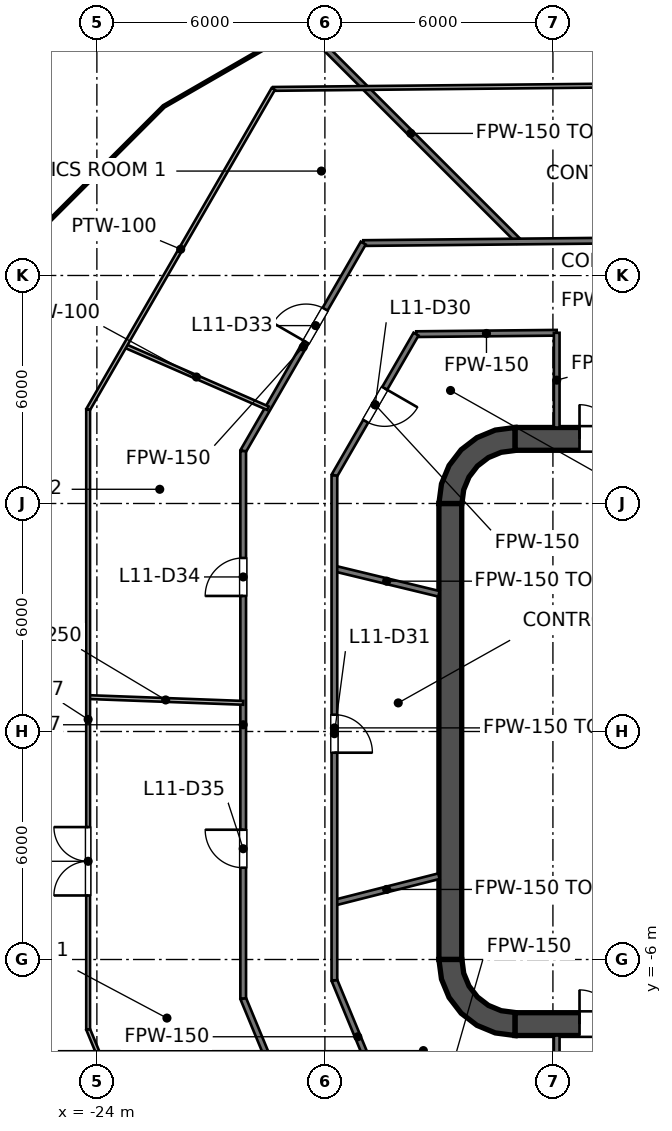
"""IFC4 building model, lengths in metres.
Left out: names, types, materials, properties, quantities, classifications, styles, units other than length and angle.
Written with IfcOpenShell. Run it as: python <this file> out.ifc"""

import sys

from ifc_helpers import new_model, si_unit, direction, frame, frame_2d, origin, place, context, subcontext, project, spatial, polyline, rectangle, outline, extrude, element, fill, save


model = new_model("IFC4")
c1 = context("Model", 3, precision=1e-05, world=origin(), true_north=direction((0.0, 1.0)))
c2 = subcontext(c1, "Body", "Model", "MODEL_VIEW")
j1 = project(units=[si_unit("LENGTHUNIT", "METRE"), si_unit("PLANEANGLEUNIT", "RADIAN")], contexts=[c1])
p1 = place(None, origin())
s1 = spatial("IfcSite", under=j1, at=p1, CompositionType="ELEMENT")
p2 = place(p1, origin())
s2 = spatial("IfcBuilding", under=s1, at=p2, CompositionType="ELEMENT")
p3 = place(p2, frame((0.0, 0.0, 67.2)))
s3 = spatial("IfcBuildingStorey", under=s2, at=p3, CompositionType="ELEMENT", Elevation=67.2)
p4 = place(p3, frame((-13.0, 7.7, 0.0), z_axis=(0.0, 0.0, 1.0), x_axis=(1.0, 0.0, 0.0)))
e1 = element("IfcWall", 1, at=p4, inside=s3, PredefinedType="SHEAR", context=c2, shape_type="SweptSolid", body=[
    extrude(rectangle(XDim=26.0, YDim=0.6, at=frame_2d((13.0, 0.0))), origin(), (0.0, 0.0, 1.0), 4.2),
])
p5 = place(p4, frame((1.7, 0.0, 0.0)))
e2 = element("IfcOpeningElement", 2, at=p5, cuts=e1, PredefinedType="OPENING", context=c2, shape_type="SweptSolid", body=[
    extrude(rectangle(XDim=1.8, YDim=2.1, at=frame_2d((0.9, 1.05))), frame((0.0, 0.3, 0.0), z_axis=(0.0, -1.0, 0.0), x_axis=(1.0, 0.0, 0.0)), (0.0, 0.0, 1.0), 0.6),
])
p6 = place(p4, frame((22.5, 0.0, 0.0)))
e3 = element("IfcOpeningElement", 3, at=p6, cuts=e1, PredefinedType="OPENING", context=c2, shape_type="SweptSolid", body=[
    extrude(rectangle(XDim=1.8, YDim=2.1, at=frame_2d((0.9, 1.05))), frame((0.0, 0.3, 0.0), z_axis=(0.0, -1.0, 0.0), x_axis=(1.0, 0.0, 0.0)), (0.0, 0.0, 1.0), 0.6),
])
p7 = place(p3, frame((-13.0, -7.7, 0.0), z_axis=(0.0, 0.0, 1.0), x_axis=(1.0, 0.0, 0.0)))
e4 = element("IfcWall", 4, at=p7, inside=s3, PredefinedType="SHEAR", context=c2, shape_type="SweptSolid", body=[
    extrude(rectangle(XDim=26.0, YDim=0.6, at=frame_2d((13.0, 0.0))), origin(), (0.0, 0.0, 1.0), 4.2),
])
p8 = place(p7, frame((1.7, 0.0, 0.0)))
e5 = element("IfcOpeningElement", 5, at=p8, cuts=e4, PredefinedType="OPENING", context=c2, shape_type="SweptSolid", body=[
    extrude(rectangle(XDim=1.8, YDim=2.1, at=frame_2d((0.9, 1.05))), frame((0.0, 0.3, 0.0), z_axis=(0.0, -1.0, 0.0), x_axis=(1.0, 0.0, 0.0)), (0.0, 0.0, 1.0), 0.6),
])
p9 = place(p7, frame((22.5, 0.0, 0.0)))
e6 = element("IfcOpeningElement", 6, at=p9, cuts=e4, PredefinedType="OPENING", context=c2, shape_type="SweptSolid", body=[
    extrude(rectangle(XDim=1.8, YDim=2.1, at=frame_2d((0.9, 1.05))), frame((0.0, 0.3, 0.0), z_axis=(0.0, -1.0, 0.0), x_axis=(1.0, 0.0, 0.0)), (0.0, 0.0, 1.0), 0.6),
])
p10 = place(p3, frame((-14.7, -6.0, 0.0), z_axis=(0.0, 0.0, 1.0), x_axis=(0.0, 1.0, 0.0)))
e7 = element("IfcWall", 7, at=p10, inside=s3, PredefinedType="SHEAR", context=c2, shape_type="SweptSolid", body=[
    extrude(rectangle(XDim=12.0, YDim=0.6, at=frame_2d((6.0, 0.0))), origin(), (0.0, 0.0, 1.0), 4.2),
])
p11 = place(p3, origin())
e8 = element("IfcWall", 8, at=p11, inside=s3, PredefinedType="SHEAR", context=c2, shape_type="SweptSolid", body=[
    extrude(outline(polyline([(-15.0, 6.0), (-14.395, 6.0), (-14.347, 6.361), (-14.208, 6.698), (-13.986, 6.986), (-13.698, 7.208), (-13.361, 7.347), (-13.0, 7.395), (-13.0, 8.0), (-13.518, 7.932), (-14.0, 7.732), (-14.414, 7.414), (-14.732, 7.0), (-14.932, 6.518), (-15.0, 6.0)])), origin(), (0.0, 0.0, 1.0), 4.2),
])
e9 = element("IfcWall", 9, at=p11, inside=s3, PredefinedType="SHEAR", context=c2, shape_type="SweptSolid", body=[
    extrude(outline(polyline([(-13.0, -8.0), (-13.0, -7.395), (-13.361, -7.347), (-13.698, -7.208), (-13.986, -6.986), (-14.208, -6.698), (-14.347, -6.361), (-14.395, -6.0), (-15.0, -6.0), (-14.932, -6.518), (-14.732, -7.0), (-14.414, -7.414), (-14.0, -7.732), (-13.518, -7.932), (-13.0, -8.0)])), origin(), (0.0, 0.0, 1.0), 4.2),
])
p12 = place(p3, frame((-11.8, -7.4, 0.0), z_axis=(0.0, 0.0, 1.0), x_axis=(0.0, 1.0, 0.0)))
e10 = element("IfcWall", 10, at=p12, inside=s3, PredefinedType="SOLIDWALL", context=c2, shape_type="SweptSolid", body=[
    extrude(rectangle(XDim=14.8, YDim=0.4, at=frame_2d((7.4, 0.0))), origin(), (0.0, 0.0, 1.0), 4.05),
])
p13 = place(p12, frame((11.2, 0.0, 0.0)))
e11 = element("IfcOpeningElement", 11, at=p13, cuts=e10, PredefinedType="OPENING", context=c2, shape_type="SweptSolid", body=[
    extrude(rectangle(XDim=1.1, YDim=2.1, at=frame_2d((0.55, 1.05))), frame((0.0, 0.2, 0.0), z_axis=(0.0, -1.0, 0.0), x_axis=(1.0, 0.0, 0.0)), (0.0, 0.0, 1.0), 0.4),
])
p14 = place(p12, frame((8.3, 0.0, 0.0)))
e12 = element("IfcOpeningElement", 12, at=p14, cuts=e10, PredefinedType="OPENING", context=c2, shape_type="SweptSolid", body=[
    extrude(rectangle(XDim=1.1, YDim=2.1, at=frame_2d((0.55, 1.05))), frame((0.0, 0.2, 0.0), z_axis=(0.0, -1.0, 0.0), x_axis=(1.0, 0.0, 0.0)), (0.0, 0.0, 1.0), 0.4),
])
p15 = place(p12, frame((5.4, 0.0, 0.0)))
e13 = element("IfcOpeningElement", 13, at=p15, cuts=e10, PredefinedType="OPENING", context=c2, shape_type="SweptSolid", body=[
    extrude(rectangle(XDim=1.1, YDim=2.1, at=frame_2d((0.55, 1.05))), frame((0.0, 0.2, 0.0), z_axis=(0.0, -1.0, 0.0), x_axis=(1.0, 0.0, 0.0)), (0.0, 0.0, 1.0), 0.4),
])
p16 = place(p12, frame((13.552, 0.0, 0.0)))
e14 = element("IfcOpeningElement", 14, at=p16, cuts=e10, PredefinedType="OPENING", context=c2, shape_type="SweptSolid", body=[
    extrude(rectangle(XDim=0.9, YDim=2.1, at=frame_2d((0.45, 1.05))), frame((0.0, 0.2, 0.0), z_axis=(0.0, -1.0, 0.0), x_axis=(1.0, 0.0, 0.0)), (0.0, 0.0, 1.0), 0.4),
])
p17 = place(p12, frame((0.347, 0.0, 0.0)))
e15 = element("IfcOpeningElement", 15, at=p17, cuts=e10, PredefinedType="OPENING", context=c2, shape_type="SweptSolid", body=[
    extrude(rectangle(XDim=0.9, YDim=2.1, at=frame_2d((0.45, 1.05))), frame((0.0, 0.2, 0.0), z_axis=(0.0, -1.0, 0.0), x_axis=(1.0, 0.0, 0.0)), (0.0, 0.0, 1.0), 0.4),
])
e16 = element("IfcWall", 16, at=p11, inside=s3, PredefinedType="SOLIDWALL", context=c2, shape_type="SweptSolid", body=[
    extrude(outline(polyline([(-12.0, -5.925), (-12.0, -5.675), (-14.15, -5.675), (-14.15, -3.025), (-12.0, -3.025), (-12.0, -2.775), (-14.15, -2.775), (-14.15, -0.125), (-12.0, -0.125), (-12.0, 0.125), (-14.15, 0.125), (-14.15, 2.775), (-12.0, 2.775), (-12.0, 3.025), (-14.15, 3.025), (-14.15, 5.675), (-12.0, 5.675), (-12.0, 5.925), (-14.15, 5.925), (-14.4, 5.925), (-14.4, 5.675), (-14.4, 3.025), (-14.4, 2.775), (-14.4, 0.125), (-14.4, -0.125), (-14.4, -2.775), (-14.4, -3.025), (-14.4, -5.675), (-14.4, -5.925), (-14.15, -5.925), (-12.0, -5.925)])), origin(), (0.0, 0.0, 1.0), 4.05),
])
p18 = place(p3, frame((-20.15, -7.025, 0.0), z_axis=(0.0, 0.0, 1.0), x_axis=(0.382713655067, -0.923867013279, 0.0)))
e17 = element("IfcWall", 17, at=p18, inside=s3, PredefinedType="PARTITIONING", context=c2, shape_type="SweptSolid", body=[
    extrude(rectangle(XDim=4.688, YDim=0.15, at=frame_2d((2.344, 0.0))), origin(), (0.0, 0.0, 1.0), 3.195),
])
p19 = place(p3, frame((-17.75, -6.547, 0.0), z_axis=(0.0, 0.0, 1.0), x_axis=(0.382760687394, -0.923847528646, 0.0)))
e18 = element("IfcWall", 18, at=p19, inside=s3, PredefinedType="PARTITIONING", context=c2, shape_type="SweptSolid", body=[
    extrude(rectangle(XDim=3.217, YDim=0.15, at=frame_2d((1.608, 0.0))), origin(), (0.0, 0.0, 1.0), 3.195),
])
p20 = place(p3, frame((-18.584, 18.584, 0.0), z_axis=(0.0, 0.0, 1.0), x_axis=(0.707106781187, -0.707106781187, 0.0)))
e19 = element("IfcWall", 19, at=p20, inside=s3, PredefinedType="PARTITIONING", context=c2, shape_type="SweptSolid", body=[
    extrude(rectangle(XDim=8.047, YDim=0.15, at=frame_2d((4.023, 0.0))), origin(), (0.0, 0.0, 1.0), 3.276),
])
p21 = place(p3, frame((-17.75, 4.288, 0.0), z_axis=(0.0, 0.0, 1.0), x_axis=(0.972001384863, -0.234975121714, 0.0)))
e20 = element("IfcWall", 20, at=p21, inside=s3, PredefinedType="PARTITIONING", context=c2, shape_type="SweptSolid", body=[
    extrude(rectangle(XDim=2.829, YDim=0.15, at=frame_2d((1.415, 0.0))), origin(), (0.0, 0.0, 1.0), 3.127),
])
p22 = place(p3, frame((-15.597, 10.456, 0.0), z_axis=(0.0, 0.0, 1.0), x_axis=(0.999950943482, 0.009905080996, 0.0)))
e21 = element("IfcWall", 21, at=p22, inside=s3, PredefinedType="PARTITIONING", context=c2, shape_type="SweptSolid", body=[
    extrude(rectangle(XDim=3.697, YDim=0.15, at=frame_2d((1.849, 0.0))), origin(), (0.0, 0.0, 1.0), 3.195),
])
p23 = place(p3, frame((-16.99, 12.853, 0.0), z_axis=(0.0, 0.0, 1.0), x_axis=(0.999950928474, 0.009906596006, 0.0)))
e22 = element("IfcWall", 22, at=p23, inside=s3, PredefinedType="PARTITIONING", context=c2, shape_type="SweptSolid", body=[
    extrude(rectangle(XDim=31.347, YDim=0.15, at=frame_2d((15.674, 0.0))), origin(), (0.0, 0.0, 1.0), 3.127),
])
p24 = place(p23, frame((21.205, 0.0, 0.0)))
e23 = element("IfcOpeningElement", 23, at=p24, cuts=e22, PredefinedType="OPENING", context=c2, shape_type="SweptSolid", body=[
    extrude(rectangle(XDim=1.0, YDim=2.1, at=frame_2d((0.5, 1.05))), frame((0.0, 0.075, 0.0), z_axis=(0.0, -1.0, 0.0), x_axis=(1.0, 0.0, 0.0)), (0.0, 0.0, 1.0), 0.15),
])
p25 = place(p23, frame((11.736, 0.0, 0.0)))
e24 = element("IfcOpeningElement", 24, at=p25, cuts=e22, PredefinedType="OPENING", context=c2, shape_type="SweptSolid", body=[
    extrude(rectangle(XDim=1.0, YDim=2.1, at=frame_2d((0.5, 1.05))), frame((0.0, 0.075, 0.0), z_axis=(0.0, -1.0, 0.0), x_axis=(1.0, 0.0, 0.0)), (0.0, 0.0, 1.0), 0.15),
])
p26 = place(p3, frame((-17.75, -4.505, 0.0), z_axis=(0.0, 0.0, 1.0), x_axis=(0.969332355751, 0.24575350271, 0.0)))
e25 = element("IfcWall", 25, at=p26, inside=s3, PredefinedType="PARTITIONING", context=c2, shape_type="SweptSolid", body=[
    extrude(rectangle(XDim=2.837, YDim=0.15, at=frame_2d((1.418, 0.0))), origin(), (0.0, 0.0, 1.0), 4.05),
])
p27 = place(p3, frame((-17.75, 6.737, 0.0), z_axis=(0.0, 0.0, 1.0), x_axis=(0.500038958046, 0.866002910178, 0.0)))
e26 = element("IfcWall", 26, at=p27, inside=s3, PredefinedType="PARTITIONING", context=c2, shape_type="SweptSolid", body=[
    extrude(rectangle(XDim=4.296, YDim=0.15, at=frame_2d((2.148, 0.0))), origin(), (0.0, 0.0, 1.0), 3.195),
])
p28 = place(p27, frame((1.647, 0.0, 0.0)))
e27 = element("IfcOpeningElement", 27, at=p28, cuts=e26, PredefinedType="OPENING", context=c2, shape_type="SweptSolid", body=[
    extrude(rectangle(XDim=1.0, YDim=2.1, at=frame_2d((0.5, 1.05))), frame((0.0, 0.075, 0.0), z_axis=(0.0, -1.0, 0.0), x_axis=(1.0, 0.0, 0.0)), (0.0, 0.0, 1.0), 0.15),
])
p29 = place(p3, frame((-20.15, 7.38, 0.0), z_axis=(0.0, 0.0, 1.0), x_axis=(0.499998889324, 0.866026045033, 0.0)))
e28 = element("IfcWall", 28, at=p29, inside=s3, PredefinedType="PARTITIONING", context=c2, shape_type="SweptSolid", body=[
    extrude(rectangle(XDim=6.32, YDim=0.15, at=frame_2d((3.16, 0.0))), origin(), (0.0, 0.0, 1.0), 3.195),
])
p30 = place(p29, frame((3.312, 0.0, 0.0)))
e29 = element("IfcOpeningElement", 29, at=p30, cuts=e28, PredefinedType="OPENING", context=c2, shape_type="SweptSolid", body=[
    extrude(rectangle(XDim=1.0, YDim=2.1, at=frame_2d((0.5, 1.05))), frame((0.0, 0.075, 0.0), z_axis=(0.0, -1.0, 0.0), x_axis=(1.0, 0.0, 0.0)), (0.0, 0.0, 1.0), 0.15),
])
p31 = place(p3, frame((-11.9, -10.739, 0.0), z_axis=(0.0, 0.0, 1.0), x_axis=(0.0, 1.0, 0.0)))
e30 = element("IfcWall", 30, at=p31, inside=s3, PredefinedType="PARTITIONING", context=c2, shape_type="SweptSolid", body=[
    extrude(rectangle(XDim=2.739, YDim=0.15, at=frame_2d((1.37, 0.0))), origin(), (0.0, 0.0, 1.0), 3.195),
])
p32 = place(p3, frame((-11.9, 8.0, 0.0), z_axis=(0.0, 0.0, 1.0), x_axis=(0.0, 1.0, 0.0)))
e31 = element("IfcWall", 31, at=p32, inside=s3, PredefinedType="PARTITIONING", context=c2, shape_type="SweptSolid", body=[
    extrude(rectangle(XDim=2.492, YDim=0.15, at=frame_2d((1.246, 0.0))), origin(), (0.0, 0.0, 1.0), 3.195),
])
p33 = place(p3, frame((-17.75, -6.547, 0.0), z_axis=(0.0, 0.0, 1.0), x_axis=(0.0, 1.0, 0.0)))
e32 = element("IfcWall", 32, at=p33, inside=s3, PredefinedType="PARTITIONING", context=c2, shape_type="SweptSolid", body=[
    extrude(rectangle(XDim=13.284, YDim=0.15, at=frame_2d((6.642, 0.0))), origin(), (0.0, 0.0, 1.0), 3.127),
])
p34 = place(p33, frame((5.989, 0.0, 0.0)))
e33 = element("IfcOpeningElement", 33, at=p34, cuts=e32, PredefinedType="OPENING", context=c2, shape_type="SweptSolid", body=[
    extrude(rectangle(XDim=1.0, YDim=2.1, at=frame_2d((0.5, 1.05))), frame((0.0, 0.075, 0.0), z_axis=(0.0, -1.0, 0.0), x_axis=(1.0, 0.0, 0.0)), (0.0, 0.0, 1.0), 0.15),
])
p35 = place(p3, frame((-20.15, -7.025, 0.0), z_axis=(0.0, 0.0, 1.0), x_axis=(0.0, 1.0, 0.0)))
e34 = element("IfcWall", 34, at=p35, inside=s3, PredefinedType="PARTITIONING", context=c2, shape_type="SweptSolid", body=[
    extrude(rectangle(XDim=14.405, YDim=0.15, at=frame_2d((7.202, 0.0))), origin(), (0.0, 0.0, 1.0), 3.127),
])
p36 = place(p35, frame((10.592, 0.0, 0.0)))
e35 = element("IfcOpeningElement", 35, at=p36, cuts=e34, PredefinedType="OPENING", context=c2, shape_type="SweptSolid", body=[
    extrude(rectangle(XDim=1.0, YDim=2.1, at=frame_2d((0.5, 1.05))), frame((0.0, 0.075, 0.0), z_axis=(0.0, -1.0, 0.0), x_axis=(1.0, 0.0, 0.0)), (0.0, 0.0, 1.0), 0.15),
])
p37 = place(p35, frame((3.44, 0.0, 0.0)))
e36 = element("IfcOpeningElement", 36, at=p37, cuts=e34, PredefinedType="OPENING", context=c2, shape_type="SweptSolid", body=[
    extrude(rectangle(XDim=1.0, YDim=2.1, at=frame_2d((0.5, 1.05))), frame((0.0, 0.075, 0.0), z_axis=(0.0, -1.0, 0.0), x_axis=(1.0, 0.0, 0.0)), (0.0, 0.0, 1.0), 0.15),
])
p38 = place(p3, frame((-24.23, -7.837, 0.0), z_axis=(0.0, 0.0, 1.0), x_axis=(0.383020677741, -0.923739768779, 0.0)))
e37 = element("IfcWall", 37, at=p38, inside=s3, PredefinedType="PARTITIONING", context=c2, shape_type="SweptSolid", body=[
    extrude(rectangle(XDim=7.188, YDim=0.1, at=frame_2d((3.594, 0.0))), origin(), (0.0, 0.0, 1.0), 3.195),
])
p39 = place(p3, frame((-23.262, 10.149, 0.0), z_axis=(0.0, 0.0, 1.0), x_axis=(0.916554042033, -0.399910850105, 0.0)))
e38 = element("IfcWall", 38, at=p39, inside=s3, PredefinedType="PARTITIONING", context=c2, shape_type="SweptSolid", body=[
    extrude(rectangle(XDim=4.105, YDim=0.1, at=frame_2d((2.053, 0.0))), origin(), (0.0, 0.0, 1.0), 3.195),
])
p40 = place(p3, frame((-24.23, 0.906, 0.0), z_axis=(0.0, 0.0, 1.0), x_axis=(0.99930587629, -0.03725272624, 0.0)))
e39 = element("IfcWall", 39, at=p40, inside=s3, PredefinedType="PARTITIONING", context=c2, shape_type="SweptSolid", body=[
    extrude(rectangle(XDim=4.083, YDim=0.1, at=frame_2d((2.042, 0.0))), origin(), (0.0, 0.0, 1.0), 4.05),
])
p41 = place(p3, frame((-19.359, 16.91, 0.0), z_axis=(0.0, 0.0, 1.0), x_axis=(0.999950841495, 0.00991537161, 0.0)))
e40 = element("IfcWall", 40, at=p41, inside=s3, PredefinedType="PARTITIONING", context=c2, shape_type="SweptSolid", body=[
    extrude(rectangle(XDim=34.792, YDim=0.1, at=frame_2d((17.396, 0.0))), origin(), (0.0, 0.0, 1.0), 3.127),
])
p42 = place(p41, frame((26.576, 0.0, 0.0)))
e41 = element("IfcOpeningElement", 41, at=p42, cuts=e40, PredefinedType="OPENING", context=c2, shape_type="SweptSolid", body=[
    extrude(rectangle(XDim=0.9, YDim=2.1, at=frame_2d((0.45, 1.05))), frame((0.0, 0.05, 0.0), z_axis=(0.0, -1.0, 0.0), x_axis=(1.0, 0.0, 0.0)), (0.0, 0.0, 1.0), 0.1),
])
p43 = place(p41, frame((10.443, 0.0, 0.0)))
e42 = element("IfcOpeningElement", 42, at=p43, cuts=e40, PredefinedType="OPENING", context=c2, shape_type="SweptSolid", body=[
    extrude(rectangle(XDim=0.9, YDim=2.1, at=frame_2d((0.45, 1.05))), frame((0.0, 0.05, 0.0), z_axis=(0.0, -1.0, 0.0), x_axis=(1.0, 0.0, 0.0)), (0.0, 0.0, 1.0), 0.1),
])
p44 = place(p3, frame((-24.23, 8.473, 0.0), z_axis=(0.0, 0.0, 1.0), x_axis=(0.50004711357, 0.865998201044, 0.0)))
e43 = element("IfcWall", 43, at=p44, inside=s3, PredefinedType="PARTITIONING", context=c2, shape_type="SweptSolid", body=[
    extrude(rectangle(XDim=9.742, YDim=0.1, at=frame_2d((4.871, 0.0))), origin(), (0.0, 0.0, 1.0), 3.195),
])
p45 = place(p3, frame((-24.23, -7.837, 0.0), z_axis=(0.0, 0.0, 1.0), x_axis=(0.0, 1.0, 0.0)))
e44 = element("IfcWall", 44, at=p45, inside=s3, PredefinedType="PARTITIONING", context=c2, shape_type="SweptSolid", body=[
    extrude(rectangle(XDim=16.31, YDim=0.1, at=frame_2d((8.155, 0.0))), origin(), (0.0, 0.0, 1.0), 3.127),
])
p46 = place(p45, frame((3.522, 0.0, 0.0)))
e45 = element("IfcOpeningElement", 45, at=p46, cuts=e44, PredefinedType="OPENING", context=c2, shape_type="SweptSolid", body=[
    extrude(rectangle(XDim=1.8, YDim=2.1, at=frame_2d((0.9, 1.05))), frame((0.0, 0.05, 0.0), z_axis=(0.0, -1.0, 0.0), x_axis=(1.0, 0.0, 0.0)), (0.0, 0.0, 1.0), 0.1),
])
p47 = place(p13, origin())
e46 = element("IfcDoor", 46, at=p47, inside=s3, OperationType="DOUBLE_DOOR_SLIDING", PredefinedType="DOOR", context=c2, shape_type="SweptSolid", body=[
    extrude(rectangle(XDim=1.1, YDim=2.1, at=frame_2d((0.55, 1.05))), frame((0.0, 0.025, 0.0), z_axis=(0.0, -1.0, 0.0), x_axis=(1.0, 0.0, 0.0)), (0.0, 0.0, 1.0), 0.05),
])
fill(e11, e46)
p48 = place(p14, origin())
e47 = element("IfcDoor", 47, at=p48, inside=s3, OperationType="DOUBLE_DOOR_SLIDING", PredefinedType="DOOR", context=c2, shape_type="SweptSolid", body=[
    extrude(rectangle(XDim=1.1, YDim=2.1, at=frame_2d((0.55, 1.05))), frame((0.0, 0.025, 0.0), z_axis=(0.0, -1.0, 0.0), x_axis=(1.0, 0.0, 0.0)), (0.0, 0.0, 1.0), 0.05),
])
fill(e12, e47)
p49 = place(p15, origin())
e48 = element("IfcDoor", 48, at=p49, inside=s3, OperationType="DOUBLE_DOOR_SLIDING", PredefinedType="DOOR", context=c2, shape_type="SweptSolid", body=[
    extrude(rectangle(XDim=1.1, YDim=2.1, at=frame_2d((0.55, 1.05))), frame((0.0, 0.025, 0.0), z_axis=(0.0, -1.0, 0.0), x_axis=(1.0, 0.0, 0.0)), (0.0, 0.0, 1.0), 0.05),
])
fill(e13, e48)
p50 = place(p16, origin())
e49 = element("IfcDoor", 49, at=p50, inside=s3, OperationType="SINGLE_SWING_LEFT", PredefinedType="DOOR", context=c2, shape_type="SweptSolid", body=[
    extrude(rectangle(XDim=0.9, YDim=2.1, at=frame_2d((0.45, 1.05))), frame((0.0, 0.025, 0.0), z_axis=(0.0, -1.0, 0.0), x_axis=(1.0, 0.0, 0.0)), (0.0, 0.0, 1.0), 0.05),
])
fill(e14, e49)
p51 = place(p17, origin())
e50 = element("IfcDoor", 50, at=p51, inside=s3, OperationType="SINGLE_SWING_LEFT", PredefinedType="DOOR", context=c2, shape_type="SweptSolid", body=[
    extrude(rectangle(XDim=0.9, YDim=2.1, at=frame_2d((0.45, 1.05))), frame((0.0, 0.025, 0.0), z_axis=(0.0, -1.0, 0.0), x_axis=(1.0, 0.0, 0.0)), (0.0, 0.0, 1.0), 0.05),
])
fill(e15, e50)
p52 = place(p5, origin())
e51 = element("IfcDoor", 51, at=p52, inside=s3, OperationType="DOUBLE_DOOR_SINGLE_SWING", PredefinedType="DOOR", context=c2, shape_type="SweptSolid", body=[
    extrude(rectangle(XDim=1.8, YDim=2.1, at=frame_2d((0.9, 1.05))), frame((0.0, 0.025, 0.0), z_axis=(0.0, -1.0, 0.0), x_axis=(1.0, 0.0, 0.0)), (0.0, 0.0, 1.0), 0.05),
])
fill(e2, e51)
p53 = place(p8, origin())
e52 = element("IfcDoor", 52, at=p53, inside=s3, OperationType="DOUBLE_DOOR_SINGLE_SWING", PredefinedType="DOOR", context=c2, shape_type="SweptSolid", body=[
    extrude(rectangle(XDim=1.8, YDim=2.1, at=frame_2d((0.9, 1.05))), frame((0.0, 0.025, 0.0), z_axis=(0.0, -1.0, 0.0), x_axis=(1.0, 0.0, 0.0)), (0.0, 0.0, 1.0), 0.05),
])
fill(e5, e52)
p54 = place(p28, origin())
e53 = element("IfcDoor", 53, at=p54, inside=s3, OperationType="SINGLE_SWING_RIGHT", PredefinedType="DOOR", context=c2, shape_type="SweptSolid", body=[
    extrude(rectangle(XDim=1.0, YDim=2.1, at=frame_2d((0.5, 1.05))), frame((0.0, 0.025, 0.0), z_axis=(0.0, -1.0, 0.0), x_axis=(1.0, 0.0, 0.0)), (0.0, 0.0, 1.0), 0.05),
])
fill(e27, e53)
p55 = place(p34, origin())
e54 = element("IfcDoor", 54, at=p55, inside=s3, OperationType="SINGLE_SWING_LEFT", PredefinedType="DOOR", context=c2, shape_type="SweptSolid", body=[
    extrude(rectangle(XDim=1.0, YDim=2.1, at=frame_2d((0.5, 1.05))), frame((0.0, 0.025, 0.0), z_axis=(0.0, -1.0, 0.0), x_axis=(1.0, 0.0, 0.0)), (0.0, 0.0, 1.0), 0.05),
])
fill(e33, e54)
p56 = place(p30, origin())
e55 = element("IfcDoor", 55, at=p56, inside=s3, OperationType="SINGLE_SWING_LEFT", PredefinedType="DOOR", context=c2, shape_type="SweptSolid", body=[
    extrude(rectangle(XDim=1.0, YDim=2.1, at=frame_2d((0.5, 1.05))), frame((0.0, 0.025, 0.0), z_axis=(0.0, -1.0, 0.0), x_axis=(1.0, 0.0, 0.0)), (0.0, 0.0, 1.0), 0.05),
])
fill(e29, e55)
p57 = place(p36, origin())
e56 = element("IfcDoor", 56, at=p57, inside=s3, OperationType="SINGLE_SWING_LEFT", PredefinedType="DOOR", context=c2, shape_type="SweptSolid", body=[
    extrude(rectangle(XDim=1.0, YDim=2.1, at=frame_2d((0.5, 1.05))), frame((0.0, 0.025, 0.0), z_axis=(0.0, -1.0, 0.0), x_axis=(1.0, 0.0, 0.0)), (0.0, 0.0, 1.0), 0.05),
])
fill(e35, e56)
p58 = place(p37, origin())
e57 = element("IfcDoor", 57, at=p58, inside=s3, OperationType="SINGLE_SWING_RIGHT", PredefinedType="DOOR", context=c2, shape_type="SweptSolid", body=[
    extrude(rectangle(XDim=1.0, YDim=2.1, at=frame_2d((0.5, 1.05))), frame((0.0, 0.025, 0.0), z_axis=(0.0, -1.0, 0.0), x_axis=(1.0, 0.0, 0.0)), (0.0, 0.0, 1.0), 0.05),
])
fill(e36, e57)
p59 = place(p46, origin())
e58 = element("IfcDoor", 58, at=p59, inside=s3, OperationType="DOUBLE_DOOR_SINGLE_SWING", PredefinedType="DOOR", context=c2, shape_type="SweptSolid", body=[
    extrude(rectangle(XDim=1.8, YDim=2.1, at=frame_2d((0.9, 1.05))), frame((0.0, 0.025, 0.0), z_axis=(0.0, -1.0, 0.0), x_axis=(1.0, 0.0, 0.0)), (0.0, 0.0, 1.0), 0.05),
])
fill(e45, e58)
save(model, sys.argv[1])
